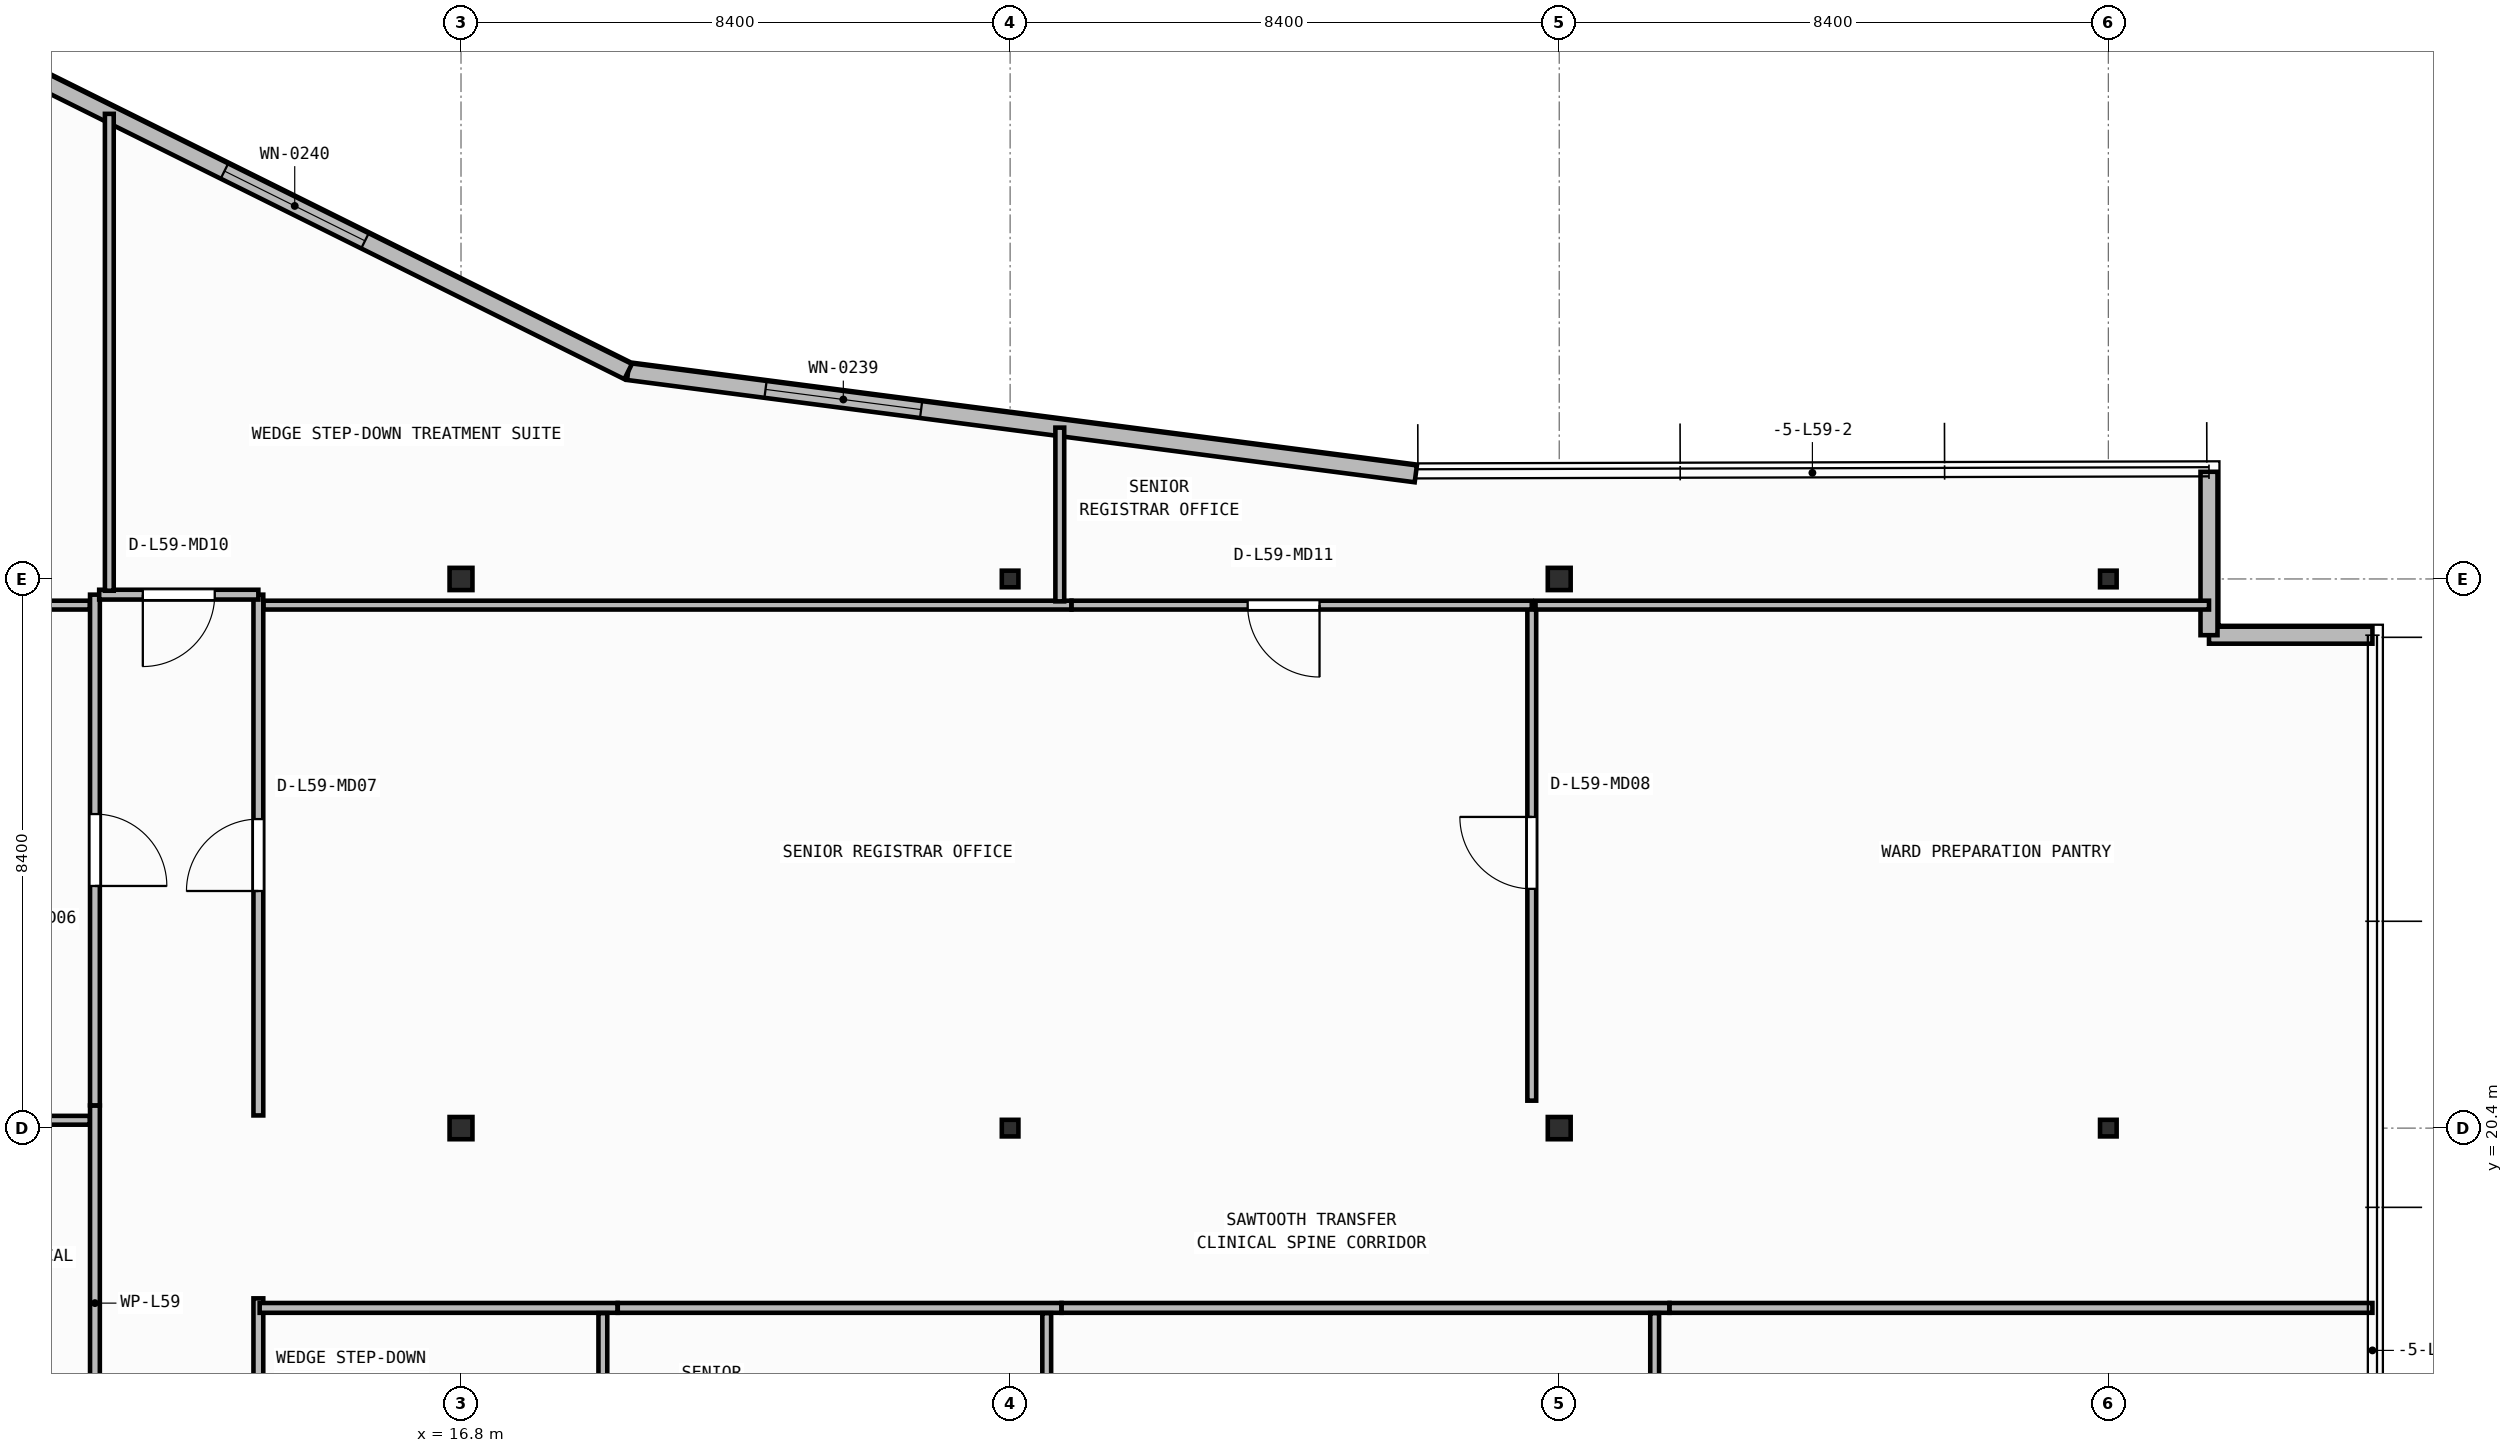
"""IFC4 building model, lengths in metres.
Left out: names, types, materials, properties, quantities, classifications, styles, units other than length and angle.
Written with IfcOpenShell. Run it as: python <this file> out.ifc"""

import sys

from ifc_helpers import new_model, si_unit, direction, frame, frame_2d, origin, origin_2d, place, context, subcontext, project, spatial, rectangle, i_section, extrude, element, fill, save


model = new_model("IFC4")
c1 = context("Model", 3, precision=1e-05, world=origin(), true_north=direction((0.0, 1.0)))
c2 = subcontext(c1, "Body", "Model", "MODEL_VIEW")
j1 = project(units=[si_unit("LENGTHUNIT", "METRE"), si_unit("PLANEANGLEUNIT", "RADIAN")], contexts=[c1])
p1 = place(None, origin())
s1 = spatial("IfcSite", under=j1, at=p1, CompositionType="ELEMENT")
p2 = place(p1, origin())
s2 = spatial("IfcBuilding", under=s1, at=p2, CompositionType="ELEMENT")
p3 = place(p2, frame((0.0, 0.0, 240.75)))
s3 = spatial("IfcBuildingStorey", under=s2, at=p3, CompositionType="ELEMENT", Elevation=240.75)
p4 = place(p3, frame((16.8, 20.4, 0.0), z_axis=(0.0, 0.0, 1.0), x_axis=(1.0, 0.0, 0.0)))
e1 = element("IfcColumn", 1, at=p4, inside=s3, PredefinedType="COLUMN", context=c2, shape_type="SweptSolid", body=[
    extrude(i_section(OverallWidth=0.35, OverallDepth=0.34, WebThickness=0.016, FlangeThickness=0.028, at=origin_2d()), origin(), (0.0, 0.0, 1.0), 3.95),
])
p5 = place(p3, frame((25.2, 20.4, 0.0), z_axis=(0.0, 0.0, 1.0), x_axis=(1.0, 0.0, 0.0)))
e2 = element("IfcColumn", 2, at=p5, inside=s3, PredefinedType="COLUMN", context=c2, shape_type="SweptSolid", body=[
    extrude(i_section(OverallWidth=0.254, OverallDepth=0.254, WebThickness=0.009, FlangeThickness=0.014, FilletRadius=0.013, at=origin_2d()), origin(), (0.0, 0.0, 1.0), 3.95),
])
p6 = place(p3, frame((33.6, 20.4, 0.0), z_axis=(0.0, 0.0, 1.0), x_axis=(1.0, 0.0, 0.0)))
e3 = element("IfcColumn", 3, at=p6, inside=s3, PredefinedType="COLUMN", context=c2, shape_type="SweptSolid", body=[
    extrude(i_section(OverallWidth=0.35, OverallDepth=0.34, WebThickness=0.016, FlangeThickness=0.028, at=origin_2d()), origin(), (0.0, 0.0, 1.0), 3.95),
])
p7 = place(p3, frame((42.0, 20.4, 0.0), z_axis=(0.0, 0.0, 1.0), x_axis=(1.0, 0.0, 0.0)))
e4 = element("IfcColumn", 4, at=p7, inside=s3, PredefinedType="COLUMN", context=c2, shape_type="SweptSolid", body=[
    extrude(i_section(OverallWidth=0.254, OverallDepth=0.254, WebThickness=0.009, FlangeThickness=0.014, FilletRadius=0.013, at=origin_2d()), origin(), (0.0, 0.0, 1.0), 3.95),
])
p8 = place(p3, frame((16.8, 28.8, 0.0), z_axis=(0.0, 0.0, 1.0), x_axis=(1.0, 0.0, 0.0)))
e5 = element("IfcColumn", 5, at=p8, inside=s3, PredefinedType="COLUMN", context=c2, shape_type="SweptSolid", body=[
    extrude(i_section(OverallWidth=0.35, OverallDepth=0.34, WebThickness=0.016, FlangeThickness=0.028, at=origin_2d()), origin(), (0.0, 0.0, 1.0), 3.95),
])
p9 = place(p3, frame((25.2, 28.8, 0.0), z_axis=(0.0, 0.0, 1.0), x_axis=(1.0, 0.0, 0.0)))
e6 = element("IfcColumn", 6, at=p9, inside=s3, PredefinedType="COLUMN", context=c2, shape_type="SweptSolid", body=[
    extrude(i_section(OverallWidth=0.254, OverallDepth=0.254, WebThickness=0.009, FlangeThickness=0.014, FilletRadius=0.013, at=origin_2d()), origin(), (0.0, 0.0, 1.0), 3.95),
])
p10 = place(p3, frame((33.6, 28.8, 0.0), z_axis=(0.0, 0.0, 1.0), x_axis=(1.0, 0.0, 0.0)))
e7 = element("IfcColumn", 7, at=p10, inside=s3, PredefinedType="COLUMN", context=c2, shape_type="SweptSolid", body=[
    extrude(i_section(OverallWidth=0.35, OverallDepth=0.34, WebThickness=0.016, FlangeThickness=0.028, at=origin_2d()), origin(), (0.0, 0.0, 1.0), 3.95),
])
p11 = place(p3, frame((42.0, 28.8, 0.0), z_axis=(0.0, 0.0, 1.0), x_axis=(1.0, 0.0, 0.0)))
e8 = element("IfcColumn", 8, at=p11, inside=s3, PredefinedType="COLUMN", context=c2, shape_type="SweptSolid", body=[
    extrude(i_section(OverallWidth=0.254, OverallDepth=0.254, WebThickness=0.009, FlangeThickness=0.014, FilletRadius=0.013, at=origin_2d()), origin(), (0.0, 0.0, 1.0), 3.95),
])
p12 = place(p3, frame((46.04, 27.94, 0.0), z_axis=(0.0, 0.0, 1.0), x_axis=(-1.0, 0.0, 0.0)))
e9 = element("IfcWall", 9, at=p12, inside=s3, PredefinedType="STANDARD", context=c2, shape_type="SweptSolid", body=[
    extrude(rectangle(XDim=2.5, YDim=0.26, at=frame_2d((1.25, 0.0))), origin(), (0.0, 0.0, 1.0), 3.71),
])
p13 = place(p3, frame((43.54, 27.94, 0.0), z_axis=(0.0, 0.0, 1.0), x_axis=(0.0, 1.0, 0.0)))
e10 = element("IfcWall", 10, at=p13, inside=s3, PredefinedType="STANDARD", context=c2, shape_type="SweptSolid", body=[
    extrude(rectangle(XDim=2.5, YDim=0.26, at=frame_2d((1.25, 0.0))), origin(), (0.0, 0.0, 1.0), 3.71),
])
p14 = place(p3, frame((31.406, 30.408, 0.0), z_axis=(0.0, 0.0, 1.0), x_axis=(-0.991671073677, 0.128796279577, 0.0)))
e11 = element("IfcWall", 11, at=p14, inside=s3, PredefinedType="STANDARD", context=c2, shape_type="SweptSolid", body=[
    extrude(rectangle(XDim=12.151, YDim=0.26, at=frame_2d((6.075, 0.0))), origin(), (0.0, 0.0, 1.0), 3.71),
])
p15 = place(p14, frame((7.631, 0.0, 0.9)))
e12 = element("IfcOpeningElement", 12, at=p15, cuts=e11, PredefinedType="OPENING", context=c2, shape_type="SweptSolid", body=[
    extrude(rectangle(XDim=2.4, YDim=1.65, at=frame_2d((1.2, 0.825))), frame((0.0, 0.14, 0.0), z_axis=(0.0, -1.0, 0.0), x_axis=(1.0, 0.0, 0.0)), (0.0, 0.0, 1.0), 0.28),
])
p16 = place(p3, frame((19.357, 31.973, 0.0), z_axis=(0.0, 0.0, 1.0), x_axis=(-0.895624365378, 0.444811191565, 0.0)))
e13 = element("IfcWall", 13, at=p16, inside=s3, PredefinedType="STANDARD", context=c2, shape_type="SweptSolid", body=[
    extrude(rectangle(XDim=11.389, YDim=0.26, at=frame_2d((5.695, 0.0))), origin(), (0.0, 0.0, 1.0), 3.71),
])
p17 = place(p16, frame((4.495, 0.0, 0.9)))
e14 = element("IfcOpeningElement", 14, at=p17, cuts=e13, PredefinedType="OPENING", context=c2, shape_type="SweptSolid", body=[
    extrude(rectangle(XDim=2.4, YDim=1.65, at=frame_2d((1.2, 0.825))), frame((0.0, 0.14, 0.0), z_axis=(0.0, -1.0, 0.0), x_axis=(1.0, 0.0, 0.0)), (0.0, 0.0, 1.0), 0.28),
])
p18 = place(p3, frame((11.2, 20.746, 0.0), z_axis=(0.0, 0.0, 1.0), x_axis=(0.0, -1.0, 0.0)))
e15 = element("IfcWall", 15, at=p18, inside=s3, PredefinedType="PARTITIONING", context=c2, shape_type="SweptSolid", body=[
    extrude(rectangle(XDim=6.046, YDim=0.15, at=frame_2d((3.023, 0.0))), origin(), (0.0, 0.0, 1.0), 3.71),
])
p19 = place(p3, frame((13.7, 14.7, 0.0), z_axis=(0.0, 0.0, 1.0), x_axis=(0.0, 1.0, 0.0)))
e16 = element("IfcWall", 16, at=p19, inside=s3, PredefinedType="PARTITIONING", context=c2, shape_type="SweptSolid", body=[
    extrude(rectangle(XDim=3.096, YDim=0.15, at=frame_2d((1.548, 0.0))), origin(), (0.0, 0.0, 1.0), 3.71),
])
p20 = place(p3, frame((11.2, 28.56, 0.0), z_axis=(0.0, 0.0, 1.0), x_axis=(0.0, -1.0, 0.0)))
e17 = element("IfcWall", 17, at=p20, inside=s3, PredefinedType="PARTITIONING", context=c2, shape_type="SweptSolid", body=[
    extrude(rectangle(XDim=7.812, YDim=0.15, at=frame_2d((3.906, 0.0))), origin(), (0.0, 0.0, 1.0), 3.71),
])
p21 = place(p20, frame((3.356, 0.0, 0.0)))
e18 = element("IfcOpeningElement", 18, at=p21, cuts=e17, PredefinedType="OPENING", context=c2, shape_type="SweptSolid", body=[
    extrude(rectangle(XDim=1.1, YDim=2.1, at=frame_2d((0.55, 1.05))), frame((0.0, 0.085, 0.0), z_axis=(0.0, -1.0, 0.0), x_axis=(1.0, 0.0, 0.0)), (0.0, 0.0, 1.0), 0.17),
])
p22 = place(p3, frame((13.7, 20.594, 0.0), z_axis=(0.0, 0.0, 1.0), x_axis=(0.0, 1.0, 0.0)))
e19 = element("IfcWall", 19, at=p22, inside=s3, PredefinedType="PARTITIONING", context=c2, shape_type="SweptSolid", body=[
    extrude(rectangle(XDim=7.966, YDim=0.15, at=frame_2d((3.983, 0.0))), origin(), (0.0, 0.0, 1.0), 3.71),
])
p23 = place(p22, frame((3.433, 0.0, 0.0)))
e20 = element("IfcOpeningElement", 20, at=p23, cuts=e19, PredefinedType="OPENING", context=c2, shape_type="SweptSolid", body=[
    extrude(rectangle(XDim=1.1, YDim=2.1, at=frame_2d((0.55, 1.05))), frame((0.0, 0.085, 0.0), z_axis=(0.0, -1.0, 0.0), x_axis=(1.0, 0.0, 0.0)), (0.0, 0.0, 1.0), 0.17),
])
p24 = place(p3, frame((13.7, 28.56, 0.0), z_axis=(0.0, 0.0, 1.0), x_axis=(-1.0, 0.0, 0.0)))
e21 = element("IfcWall", 21, at=p24, inside=s3, PredefinedType="PARTITIONING", context=c2, shape_type="SweptSolid", body=[
    extrude(rectangle(XDim=2.435, YDim=0.15, at=frame_2d((1.218, 0.0))), origin(), (0.0, 0.0, 1.0), 3.157),
])
p25 = place(p24, frame((0.667, 0.0, 0.0)))
e22 = element("IfcOpeningElement", 22, at=p25, cuts=e21, PredefinedType="OPENING", context=c2, shape_type="SweptSolid", body=[
    extrude(rectangle(XDim=1.1, YDim=2.1, at=frame_2d((0.55, 1.05))), frame((0.0, 0.085, 0.0), z_axis=(0.0, -1.0, 0.0), x_axis=(1.0, 0.0, 0.0)), (0.0, 0.0, 1.0), 0.17),
])
p26 = place(p3, frame((13.72, 17.65, 0.0), z_axis=(0.0, 0.0, 1.0), x_axis=(1.0, 0.0, 0.0)))
e23 = element("IfcWall", 23, at=p26, inside=s3, PredefinedType="PARTITIONING", context=c2, shape_type="SweptSolid", body=[
    extrude(rectangle(XDim=5.476, YDim=0.15, at=frame_2d((2.738, 0.0))), origin(), (0.0, 0.0, 1.0), 3.71),
])
p27 = place(p3, frame((19.198, 17.65, 0.0), z_axis=(0.0, 0.0, 1.0), x_axis=(1.0, 0.0, 0.0)))
e24 = element("IfcWall", 24, at=p27, inside=s3, PredefinedType="PARTITIONING", context=c2, shape_type="SweptSolid", body=[
    extrude(rectangle(XDim=6.788, YDim=0.15, at=frame_2d((3.394, 0.0))), origin(), (0.0, 0.0, 1.0), 3.71),
])
p28 = place(p3, frame((25.988, 17.65, 0.0), z_axis=(0.0, 0.0, 1.0), x_axis=(1.0, 0.0, 0.0)))
e25 = element("IfcWall", 25, at=p28, inside=s3, PredefinedType="PARTITIONING", context=c2, shape_type="SweptSolid", body=[
    extrude(rectangle(XDim=9.298, YDim=0.15, at=frame_2d((4.649, 0.0))), origin(), (0.0, 0.0, 1.0), 3.71),
])
p29 = place(p3, frame((35.288, 17.65, 0.0), z_axis=(0.0, 0.0, 1.0), x_axis=(1.0, 0.0, 0.0)))
e26 = element("IfcWall", 26, at=p29, inside=s3, PredefinedType="PARTITIONING", context=c2, shape_type="SweptSolid", body=[
    extrude(rectangle(XDim=10.752, YDim=0.15, at=frame_2d((5.376, 0.0))), origin(), (0.0, 0.0, 1.0), 3.71),
])
p30 = place(p3, frame((11.12, 20.52, 0.0), z_axis=(0.0, 0.0, 1.0), x_axis=(-1.0, 0.0, 0.0)))
e27 = element("IfcWall", 27, at=p30, inside=s3, PredefinedType="PARTITIONING", context=c2, shape_type="SweptSolid", body=[
    extrude(rectangle(XDim=5.673, YDim=0.135, at=frame_2d((2.836, 0.0))), origin(), (0.0, 0.0, 1.0), 3.157),
])
for number, where, z_axis, x_axis in (
    (28, (18.97, 14.76, 0.0), (0.0, 0.0, 1.0), (0.0, 1.0, 0.0)),
    (29, (25.76, 14.76, 0.0), (0.0, 0.0, 1.0), (0.0, 1.0, 0.0)),
    (30, (35.06, 14.76, 0.0), (0.0, 0.0, 1.0), (0.0, 1.0, 0.0)),
):
    element("IfcWall", number, at=place(p3, frame(where, z_axis=z_axis, x_axis=x_axis)), inside=s3, PredefinedType="PARTITIONING", context=c2, shape_type="SweptSolid", body=[
        extrude(rectangle(XDim=2.81, YDim=0.135, at=frame_2d((1.405, 0.0))), origin(), (0.0, 0.0, 1.0), 3.71),
    ])
p31 = place(p3, frame((11.12, 28.4, 0.0), z_axis=(0.0, 0.0, 1.0), x_axis=(-1.0, 0.0, 0.0)))
e31 = element("IfcWall", 31, at=p31, inside=s3, PredefinedType="PARTITIONING", context=c2, shape_type="SweptSolid", body=[
    extrude(rectangle(XDim=10.88, YDim=0.135, at=frame_2d((5.44, 0.0))), origin(), (0.0, 0.0, 1.0), 3.157),
])
p32 = place(p31, frame((5.828, 0.0, 0.0)))
e32 = element("IfcOpeningElement", 32, at=p32, cuts=e31, PredefinedType="OPENING", context=c2, shape_type="SweptSolid", body=[
    extrude(rectangle(XDim=1.1, YDim=2.1, at=frame_2d((0.55, 1.05))), frame((0.0, 0.077, 0.0), z_axis=(0.0, -1.0, 0.0), x_axis=(1.0, 0.0, 0.0)), (0.0, 0.0, 1.0), 0.155),
])
p33 = place(p3, frame((33.18, 20.82, 0.0), z_axis=(0.0, 0.0, 1.0), x_axis=(0.0, 1.0, 0.0)))
e33 = element("IfcWall", 33, at=p33, inside=s3, PredefinedType="PARTITIONING", context=c2, shape_type="SweptSolid", body=[
    extrude(rectangle(XDim=7.58, YDim=0.135, at=frame_2d((3.79, 0.0))), origin(), (0.0, 0.0, 1.0), 3.157),
])
p34 = place(p33, frame((3.24, 0.0, 0.0)))
e34 = element("IfcOpeningElement", 34, at=p34, cuts=e33, PredefinedType="OPENING", context=c2, shape_type="SweptSolid", body=[
    extrude(rectangle(XDim=1.1, YDim=2.1, at=frame_2d((0.55, 1.05))), frame((0.0, 0.077, 0.0), z_axis=(0.0, -1.0, 0.0), x_axis=(1.0, 0.0, 0.0)), (0.0, 0.0, 1.0), 0.155),
])
p35 = place(p3, frame((26.138, 28.4, 0.0), z_axis=(0.0, 0.0, 1.0), x_axis=(-1.0, 0.0, 0.0)))
e35 = element("IfcWall", 35, at=p35, inside=s3, PredefinedType="PARTITIONING", context=c2, shape_type="SweptSolid", body=[
    extrude(rectangle(XDim=12.358, YDim=0.135, at=frame_2d((6.179, 0.0))), origin(), (0.0, 0.0, 1.0), 3.157),
])
p36 = place(p3, frame((33.18, 28.4, 0.0), z_axis=(0.0, 0.0, 1.0), x_axis=(-1.0, 0.0, 0.0)))
e36 = element("IfcWall", 36, at=p36, inside=s3, PredefinedType="PARTITIONING", context=c2, shape_type="SweptSolid", body=[
    extrude(rectangle(XDim=7.04, YDim=0.135, at=frame_2d((3.52, 0.0))), origin(), (0.0, 0.0, 1.0), 3.326),
])
p37 = place(p36, frame((3.247, 0.0, 0.0)))
e37 = element("IfcOpeningElement", 37, at=p37, cuts=e36, PredefinedType="OPENING", context=c2, shape_type="SweptSolid", body=[
    extrude(rectangle(XDim=1.1, YDim=2.1, at=frame_2d((0.55, 1.05))), frame((0.0, 0.077, 0.0), z_axis=(0.0, -1.0, 0.0), x_axis=(1.0, 0.0, 0.0)), (0.0, 0.0, 1.0), 0.155),
])
p38 = place(p3, frame((43.54, 28.4, 0.0), z_axis=(0.0, 0.0, 1.0), x_axis=(-1.0, 0.0, 0.0)))
e38 = element("IfcWall", 38, at=p38, inside=s3, PredefinedType="PARTITIONING", context=c2, shape_type="SweptSolid", body=[
    extrude(rectangle(XDim=10.302, YDim=0.135, at=frame_2d((5.151, 0.0))), origin(), (0.0, 0.0, 1.0), 3.326),
])
p39 = place(p3, frame((11.42, 28.62, 0.0), z_axis=(0.0, 0.0, 1.0), x_axis=(0.0, 1.0, 0.0)))
e39 = element("IfcWall", 39, at=p39, inside=s3, PredefinedType="PARTITIONING", context=c2, shape_type="SweptSolid", body=[
    extrude(rectangle(XDim=7.294, YDim=0.135, at=frame_2d((3.647, 0.0))), origin(), (0.0, 0.0, 1.0), 3.71),
])
p40 = place(p3, frame((25.96, 28.458, 0.0), z_axis=(0.0, 0.0, 1.0), x_axis=(0.0, 1.0, 0.0)))
e40 = element("IfcWall", 40, at=p40, inside=s3, PredefinedType="PARTITIONING", context=c2, shape_type="SweptSolid", body=[
    extrude(rectangle(XDim=2.658, YDim=0.135, at=frame_2d((1.329, 0.0))), origin(), (0.0, 0.0, 1.0), 3.71),
])
p41 = place(p15, origin())
e41 = element("IfcWindow", 41, at=p41, inside=s3, PartitioningType="SINGLE_PANEL", PredefinedType="WINDOW", context=c2, shape_type="SweptSolid", body=[
    extrude(rectangle(XDim=2.4, YDim=1.65, at=frame_2d((1.2, 0.825))), frame((0.0, 0.03, 0.0), z_axis=(0.0, -1.0, 0.0), x_axis=(1.0, 0.0, 0.0)), (0.0, 0.0, 1.0), 0.06),
])
fill(e12, e41)
p42 = place(p17, origin())
e42 = element("IfcWindow", 42, at=p42, inside=s3, PartitioningType="SINGLE_PANEL", PredefinedType="WINDOW", context=c2, shape_type="SweptSolid", body=[
    extrude(rectangle(XDim=2.4, YDim=1.65, at=frame_2d((1.2, 0.825))), frame((0.0, 0.03, 0.0), z_axis=(0.0, -1.0, 0.0), x_axis=(1.0, 0.0, 0.0)), (0.0, 0.0, 1.0), 0.06),
])
fill(e14, e42)
p43 = place(p21, origin())
e43 = element("IfcDoor", 43, at=p43, inside=s3, OperationType="SINGLE_SWING_RIGHT", PredefinedType="DOOR", context=c2, shape_type="SweptSolid", body=[
    extrude(rectangle(XDim=1.1, YDim=2.1, at=frame_2d((0.55, 1.05))), frame((0.0, 0.025, 0.0), z_axis=(0.0, -1.0, 0.0), x_axis=(1.0, 0.0, 0.0)), (0.0, 0.0, 1.0), 0.05),
])
fill(e18, e43)
p44 = place(p23, origin())
e44 = element("IfcDoor", 44, at=p44, inside=s3, OperationType="SINGLE_SWING_LEFT", PredefinedType="DOOR", context=c2, shape_type="SweptSolid", body=[
    extrude(rectangle(XDim=1.1, YDim=2.1, at=frame_2d((0.55, 1.05))), frame((0.0, 0.025, 0.0), z_axis=(0.0, -1.0, 0.0), x_axis=(1.0, 0.0, 0.0)), (0.0, 0.0, 1.0), 0.05),
])
fill(e20, e44)
p45 = place(p25, origin())
e45 = element("IfcDoor", 45, at=p45, inside=s3, OperationType="SINGLE_SWING_RIGHT", PredefinedType="DOOR", context=c2, shape_type="SweptSolid", body=[
    extrude(rectangle(XDim=1.1, YDim=2.1, at=frame_2d((0.55, 1.05))), frame((0.0, 0.025, 0.0), z_axis=(0.0, -1.0, 0.0), x_axis=(1.0, 0.0, 0.0)), (0.0, 0.0, 1.0), 0.05),
])
fill(e22, e45)
p46 = place(p34, origin())
e46 = element("IfcDoor", 46, at=p46, inside=s3, OperationType="SINGLE_SWING_RIGHT", PredefinedType="DOOR", context=c2, shape_type="SweptSolid", body=[
    extrude(rectangle(XDim=1.1, YDim=2.1, at=frame_2d((0.55, 1.05))), frame((0.0, 0.025, 0.0), z_axis=(0.0, -1.0, 0.0), x_axis=(1.0, 0.0, 0.0)), (0.0, 0.0, 1.0), 0.05),
])
fill(e34, e46)
p47 = place(p37, origin())
e47 = element("IfcDoor", 47, at=p47, inside=s3, OperationType="SINGLE_SWING_LEFT", PredefinedType="DOOR", context=c2, shape_type="SweptSolid", body=[
    extrude(rectangle(XDim=1.1, YDim=2.1, at=frame_2d((0.55, 1.05))), frame((0.0, 0.025, 0.0), z_axis=(0.0, -1.0, 0.0), x_axis=(1.0, 0.0, 0.0)), (0.0, 0.0, 1.0), 0.05),
])
fill(e37, e47)
save(model, sys.argv[1])
